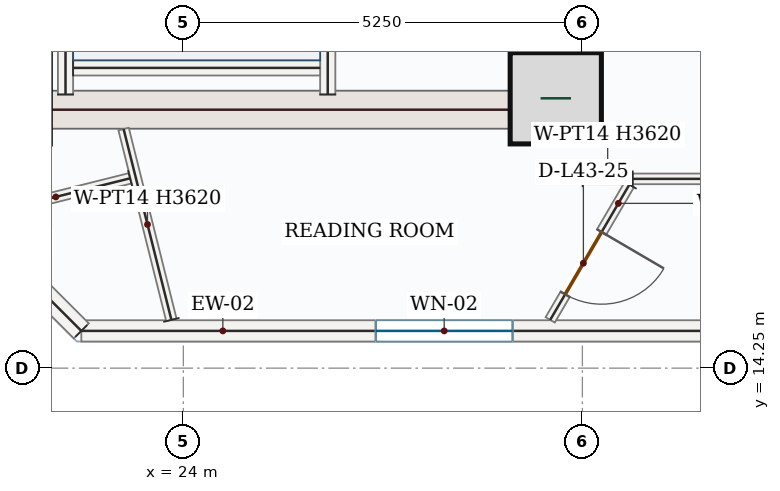
"""IFC4 building model, lengths in metres.
Left out: names, types, materials, properties, quantities, classifications, styles, units other than length and angle.
Written with IfcOpenShell. Run it as: python <this file> out.ifc"""

import sys

from ifc_helpers import new_model, si_unit, direction, frame, frame_2d, origin, origin_2d, place, context, subcontext, project, spatial, rectangle, extrude, source, transform, mapped, element, fill, save


model = new_model("IFC4")
c1 = context("Model", 3, precision=1e-05, world=origin(), true_north=direction((0.0, 1.0)))
c2 = subcontext(c1, "Body", "Model", "MODEL_VIEW")
j1 = project(units=[si_unit("LENGTHUNIT", "METRE"), si_unit("PLANEANGLEUNIT", "RADIAN")], contexts=[c1])
p1 = place(None, origin())
s1 = spatial("IfcSite", under=j1, at=p1, CompositionType="ELEMENT")
p2 = place(p1, origin())
s2 = spatial("IfcBuilding", under=s1, at=p2, CompositionType="ELEMENT")
p3 = place(p2, frame((0.0, 0.0, 186.3)))
s3 = spatial("IfcBuildingStorey", under=s2, at=p3, CompositionType="ELEMENT", Elevation=186.3)
p4 = place(p3, frame((29.0, 17.4, 0.0), z_axis=(0.0, 0.0, 1.0), x_axis=(0.0, 1.0, 0.0)))
e1 = element("IfcWall", 1, at=p4, inside=s3, PredefinedType="SHEAR", context=c2, shape_type="SweptSolid", body=[
    extrude(rectangle(XDim=8.55, YDim=0.5, at=frame_2d((4.275, 0.0))), origin(), (0.0, 0.0, 1.0), 3.62),
])
p5 = place(p4, frame((6.65, 0.0, 0.0)))
e2 = element("IfcOpeningElement", 2, at=p5, cuts=e1, PredefinedType="OPENING", context=c2, shape_type="SweptSolid", body=[
    extrude(rectangle(XDim=1.1, YDim=2.2, at=frame_2d((0.55, 1.1))), frame((0.0, 0.26, 0.0), z_axis=(0.0, -1.0, 0.0), x_axis=(1.0, 0.0, 0.0)), (0.0, 0.0, 1.0), 0.52),
])
p6 = place(p4, frame((3.15, 0.0, 0.0)))
e3 = element("IfcOpeningElement", 3, at=p6, cuts=e1, PredefinedType="OPENING", context=c2, shape_type="SweptSolid", body=[
    extrude(rectangle(XDim=0.88, YDim=2.1, at=frame_2d((0.44, 1.05))), frame((0.0, 0.26, 0.0), z_axis=(0.0, -1.0, 0.0), x_axis=(1.0, 0.0, 0.0)), (0.0, 0.0, 1.0), 0.52),
])
m1 = source(origin(), c2, "Body", "SweptSolid", [
    extrude(rectangle(XDim=7.0, YDim=0.5, at=frame_2d((3.5, 0.0))), origin(), (0.0, 0.0, 1.0), 3.62),
])
p7 = place(p3, frame((21.75, 17.65, 0.0), z_axis=(0.0, 0.0, 1.0), x_axis=(1.0, 0.0, 0.0)))
e4 = element("IfcWall", 4, at=p7, inside=s3, PredefinedType="SHEAR", context=c2, shape_type="MappedRepresentation", body=[
    mapped(m1, transform((0.0, 0.0, 0.0), x_axis=(1.0, 0.0, 0.0), y_axis=(0.0, 1.0, 0.0), z_axis=(0.0, 0.0, 1.0), scale=1.0)),
])
m2 = source(origin(), c2, "Body", "SweptSolid", [
    extrude(rectangle(XDim=1.2, YDim=1.2, at=origin_2d()), origin(), (0.0, 0.0, 1.0), 3.9),
])
p8 = place(p3, frame((28.9, 17.8, 0.0), z_axis=(0.0, 0.0, 1.0), x_axis=(1.0, 0.0, 0.0)))
e5 = element("IfcColumn", 5, at=p8, inside=s3, PredefinedType="COLUMN", context=c2, shape_type="MappedRepresentation", body=[
    mapped(m2, transform((0.0, 0.0, 0.0), x_axis=(1.0, 0.0, 0.0), y_axis=(0.0, 1.0, 0.0), z_axis=(0.0, 0.0, 1.0), scale=1.0)),
])
p9 = place(p3, frame((32.205, 14.74, 0.0), z_axis=(0.0, 0.0, 1.0), x_axis=(-1.0, 0.0, 0.0)))
e6 = element("IfcWall", 6, at=p9, inside=s3, PredefinedType="SOLIDWALL", context=c2, shape_type="SweptSolid", body=[
    extrude(rectangle(XDim=9.547, YDim=0.28, at=frame_2d((4.773, 0.0))), origin(), (0.0, 0.0, 1.0), 3.62),
])
p10 = place(p9, frame((3.873, 0.0, 0.85)))
e7 = element("IfcOpeningElement", 7, at=p10, cuts=e6, PredefinedType="OPENING", context=c2, shape_type="SweptSolid", body=[
    extrude(rectangle(XDim=1.8, YDim=1.75, at=frame_2d((0.9, 0.875))), frame((0.0, 0.15, 0.0), z_axis=(0.0, -1.0, 0.0), x_axis=(1.0, 0.0, 0.0)), (0.0, 0.0, 1.0), 0.3),
])
m3 = source(origin(), c2, "Body", "SweptSolid", [
    extrude(rectangle(XDim=2.322, YDim=0.28, at=frame_2d((1.161, 0.0))), origin(), (0.0, 0.0, 1.0), 3.62),
])
p11 = place(p3, frame((22.658, 14.74, 0.0), z_axis=(0.0, 0.0, 1.0), x_axis=(-0.707106781187, 0.707106781187, 0.0)))
e8 = element("IfcWall", 8, at=p11, inside=s3, PredefinedType="SOLIDWALL", context=c2, shape_type="MappedRepresentation", body=[
    mapped(m3, transform((0.0, 0.0, 0.0), x_axis=(1.0, 0.0, 0.0), y_axis=(0.0, 1.0, 0.0), z_axis=(0.0, 0.0, 1.0), scale=1.0)),
])
m4 = source(origin(), c2, "Body", "SweptSolid", [
    extrude(rectangle(XDim=7.87, YDim=0.2, at=frame_2d((3.935, 0.0))), origin(), (0.0, 0.0, 1.0), 3.62),
])
p12 = place(p3, frame((22.45, 17.85, 0.0), z_axis=(0.0, 0.0, 1.0), x_axis=(0.0, 1.0, 0.0)))
e9 = element("IfcWall", 9, at=p12, inside=s3, PredefinedType="SOLIDWALL", context=c2, shape_type="MappedRepresentation", body=[
    mapped(m4, transform((0.0, 0.0, 0.0), x_axis=(1.0, 0.0, 0.0), y_axis=(0.0, 1.0, 0.0), z_axis=(0.0, 0.0, 1.0), scale=1.0)),
])
p13 = place(p3, frame((25.9, 17.85, 0.0), z_axis=(0.0, 0.0, 1.0), x_axis=(0.0, 1.0, 0.0)))
e10 = element("IfcWall", 10, at=p13, inside=s3, PredefinedType="SOLIDWALL", context=c2, shape_type="SweptSolid", body=[
    extrude(rectangle(XDim=8.0, YDim=0.2, at=frame_2d((4.0, 0.0))), origin(), (0.0, 0.0, 1.0), 3.62),
])
p14 = place(p13, frame((6.3, 0.0, 0.0)))
e11 = element("IfcOpeningElement", 11, at=p14, cuts=e10, PredefinedType="OPENING", context=c2, shape_type="SweptSolid", body=[
    extrude(rectangle(XDim=1.05, YDim=2.15, at=frame_2d((0.525, 1.075))), frame((0.0, 0.11, 0.0), z_axis=(0.0, -1.0, 0.0), x_axis=(1.0, 0.0, 0.0)), (0.0, 0.0, 1.0), 0.22),
])
m5 = source(origin(), c2, "Body", "SweptSolid", [
    extrude(rectangle(XDim=3.25, YDim=0.2, at=frame_2d((1.625, 0.0))), origin(), (0.0, 0.0, 1.0), 3.62),
])
p15 = place(p3, frame((22.55, 18.2, 0.0), z_axis=(0.0, 0.0, 1.0), x_axis=(1.0, 0.0, 0.0)))
e12 = element("IfcWall", 12, at=p15, inside=s3, PredefinedType="SOLIDWALL", context=c2, shape_type="MappedRepresentation", body=[
    mapped(m5, transform((0.0, 0.0, 0.0), x_axis=(1.0, 0.0, 0.0), y_axis=(0.0, 1.0, 0.0), z_axis=(0.0, 0.0, 1.0), scale=1.0)),
])
m6 = source(origin(), c2, "Body", "SweptSolid", [
    extrude(rectangle(XDim=0.659, YDim=0.14, at=frame_2d((0.329, 0.0))), origin(), (0.0, 0.0, 1.0), 3.62),
])
p16 = place(p3, frame((29.253, 16.74, 0.0), z_axis=(0.0, 0.0, 1.0), x_axis=(0.999999725245, -0.000741289641, 0.0)))
e13 = element("IfcWall", 13, at=p16, inside=s3, PredefinedType="PARTITIONING", context=c2, shape_type="MappedRepresentation", body=[
    mapped(m6, transform((0.0, 0.0, 0.0), x_axis=(1.0, 0.0, 0.0), y_axis=(0.0, 1.0, 0.0), z_axis=(0.0, 0.0, 1.0), scale=1.0)),
])
p17 = place(p3, frame((29.868, 16.665, 0.0), z_axis=(0.0, 0.0, 1.0), x_axis=(-0.505011455642, -0.863112640198, 0.0)))
e14 = element("IfcWall", 14, at=p17, inside=s3, PredefinedType="PARTITIONING", context=c2, shape_type="SweptSolid", body=[
    extrude(rectangle(XDim=2.062, YDim=0.14, at=frame_2d((1.031, 0.0))), origin(), (0.0, 0.0, 1.0), 3.62),
])
p18 = place(p17, frame((0.723, 0.0, 0.0)))
e15 = element("IfcOpeningElement", 15, at=p18, cuts=e14, PredefinedType="OPENING", context=c2, shape_type="SweptSolid", body=[
    extrude(rectangle(XDim=0.95, YDim=2.15, at=frame_2d((0.475, 1.075))), frame((0.0, 0.08, 0.0), z_axis=(0.0, -1.0, 0.0), x_axis=(1.0, 0.0, 0.0)), (0.0, 0.0, 1.0), 0.16),
])
m7 = source(origin(), c2, "Body", "SweptSolid", [
    extrude(rectangle(XDim=2.588, YDim=0.14, at=frame_2d((1.294, 0.0))), origin(), (0.0, 0.0, 1.0), 3.62),
])
p19 = place(p3, frame((23.843, 14.885, 0.0), z_axis=(0.0, 0.0, 1.0), x_axis=(-0.242957412811, 0.97003695577, 0.0)))
e16 = element("IfcWall", 16, at=p19, inside=s3, PredefinedType="PARTITIONING", context=c2, shape_type="MappedRepresentation", body=[
    mapped(m7, transform((0.0, 0.0, 0.0), x_axis=(1.0, 0.0, 0.0), y_axis=(0.0, 1.0, 0.0), z_axis=(0.0, 0.0, 1.0), scale=1.0)),
])
m8 = source(origin(), c2, "Body", "SweptSolid", [
    extrude(rectangle(XDim=2.014, YDim=0.14, at=frame_2d((1.007, 0.0))), origin(), (0.0, 0.0, 1.0), 3.62),
])
p20 = place(p3, frame((23.299, 16.747, 0.0), z_axis=(0.0, 0.0, 1.0), x_axis=(-0.970056889313, -0.242877811867, 0.0)))
e17 = element("IfcWall", 17, at=p20, inside=s3, PredefinedType="PARTITIONING", context=c2, shape_type="MappedRepresentation", body=[
    mapped(m8, transform((0.0, 0.0, 0.0), x_axis=(1.0, 0.0, 0.0), y_axis=(0.0, 1.0, 0.0), z_axis=(0.0, 0.0, 1.0), scale=1.0)),
])
p21 = place(p3, frame((29.912, 16.74, 0.0), z_axis=(0.0, 0.0, 1.0), x_axis=(1.0, 0.0, 0.0)))
e18 = element("IfcWall", 18, at=p21, inside=s3, PredefinedType="PARTITIONING", context=c2, shape_type="SweptSolid", body=[
    extrude(rectangle(XDim=7.806, YDim=0.14, at=frame_2d((3.903, 0.0))), origin(), (0.0, 0.0, 1.0), 3.62),
])
p22 = place(p21, frame((5.348, 0.0, 0.0)))
e19 = element("IfcOpeningElement", 19, at=p22, cuts=e18, PredefinedType="OPENING", context=c2, shape_type="SweptSolid", body=[
    extrude(rectangle(XDim=0.95, YDim=2.15, at=frame_2d((0.475, 1.075))), frame((0.0, 0.08, 0.0), z_axis=(0.0, -1.0, 0.0), x_axis=(1.0, 0.0, 0.0)), (0.0, 0.0, 1.0), 0.16),
])
m9 = source(origin(), c2, "Body", "SweptSolid", [
    extrude(rectangle(XDim=1.8, YDim=1.75, at=frame_2d((0.9, 0.875))), frame((0.0, 0.03, 0.0), z_axis=(0.0, -1.0, 0.0), x_axis=(1.0, 0.0, 0.0)), (0.0, 0.0, 1.0), 0.06),
])
p23 = place(p10, origin())
e20 = element("IfcWindow", 20, at=p23, inside=s3, PartitioningType="DOUBLE_PANEL_VERTICAL", PredefinedType="WINDOW", context=c2, shape_type="MappedRepresentation", body=[
    mapped(m9, transform((0.0, 0.0, 0.0), x_axis=(1.0, 0.0, 0.0), y_axis=(0.0, 1.0, 0.0), z_axis=(0.0, 0.0, 1.0), scale=1.0)),
])
fill(e7, e20)
m10 = source(origin(), c2, "Body", "SweptSolid", [
    extrude(rectangle(XDim=0.95, YDim=2.15, at=frame_2d((0.475, 1.075))), frame((0.0, 0.025, 0.0), z_axis=(0.0, -1.0, 0.0), x_axis=(1.0, 0.0, 0.0)), (0.0, 0.0, 1.0), 0.05),
])
p24 = place(p18, origin())
e21 = element("IfcDoor", 21, at=p24, inside=s3, OperationType="SINGLE_SWING_LEFT", PredefinedType="DOOR", context=c2, shape_type="MappedRepresentation", body=[
    mapped(m10, transform((0.0, 0.0, 0.0), x_axis=(1.0, 0.0, 0.0), y_axis=(0.0, 1.0, 0.0), z_axis=(0.0, 0.0, 1.0), scale=1.0)),
])
fill(e15, e21)
save(model, sys.argv[1])
